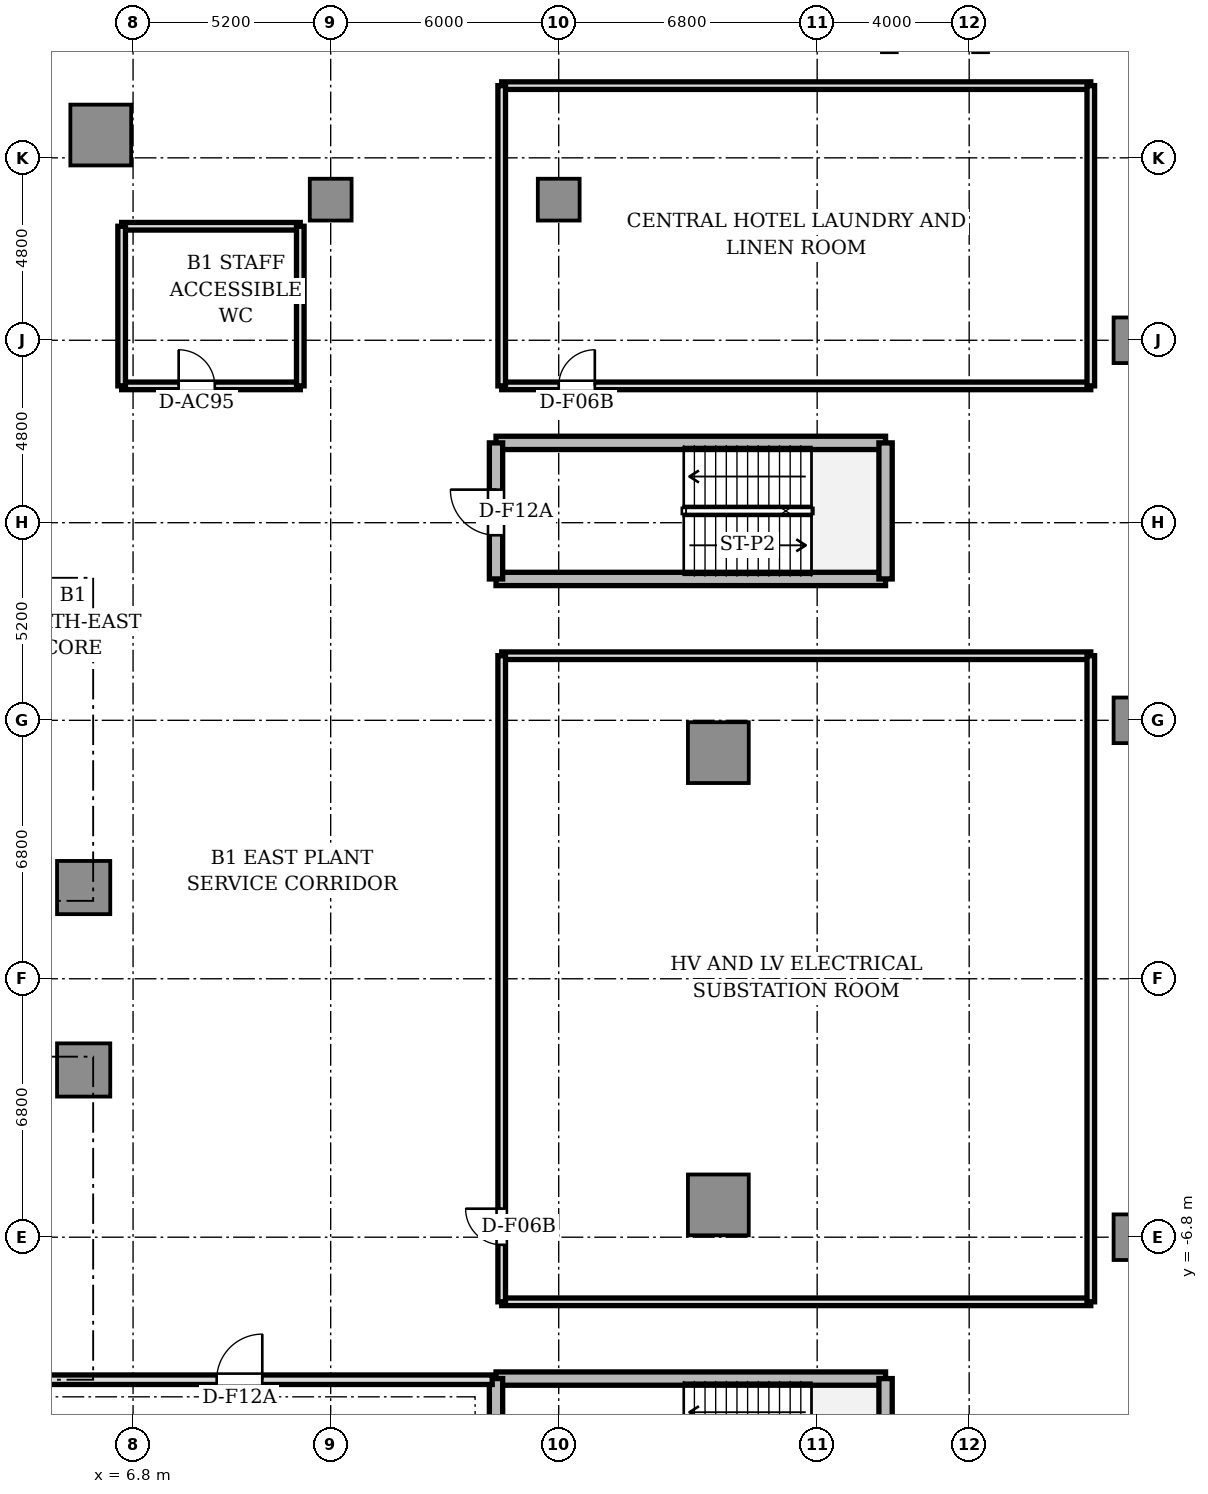
"""IFC4 building model, lengths in metres.
Left out: names, types, materials, properties, quantities, classifications, styles, units other than length and angle.
Written with IfcOpenShell. Run it as: python <this file> out.ifc"""

import sys

from ifc_helpers import new_model, si_unit, direction, frame, frame_2d, origin, origin_2d, place, context, subcontext, project, spatial, rectangle, circle, extrude, source, transform, mapped, element, fill, save


model = new_model("IFC4")
c1 = context("Model", 3, precision=1e-05, world=origin(), true_north=direction((0.0, 1.0)))
c2 = subcontext(c1, "Body", "Model", "MODEL_VIEW")
j1 = project(units=[si_unit("LENGTHUNIT", "METRE"), si_unit("PLANEANGLEUNIT", "RADIAN")], contexts=[c1])
p1 = place(None, origin())
s1 = spatial("IfcSite", under=j1, at=p1, CompositionType="ELEMENT")
p2 = place(p1, origin())
s2 = spatial("IfcBuilding", under=s1, at=p2, CompositionType="ELEMENT")
p3 = place(p2, frame((0.0, 0.0, -4.5)))
s3 = spatial("IfcBuildingStorey", under=s2, at=p3, CompositionType="ELEMENT", Elevation=-4.5)
m1 = source(origin(), c2, "Body", "SweptSolid", [
    extrude(rectangle(XDim=1.4, YDim=1.4, at=origin_2d()), origin(), (0.0, 0.0, 1.0), 4.1),
])
for number, where, z_axis, x_axis in (
    (1, (5.5, 2.4, 0.0), (0.0, 0.0, 1.0), (1.0, 0.0, 0.0)),
    (2, (5.5, -2.4, 0.0), (0.0, 0.0, 1.0), (1.0, 0.0, 0.0)),
):
    element("IfcColumn", number, at=place(p3, frame(where, z_axis=z_axis, x_axis=x_axis)), inside=s3, PredefinedType="COLUMN", context=c2, shape_type="MappedRepresentation", body=[
        mapped(m1, transform((0.0, 0.0, 0.0), scale=1.0)),
    ])
m2 = source(origin(), c2, "Body", "SweptSolid", [
    extrude(rectangle(XDim=1.6, YDim=1.6, at=origin_2d()), origin(), (0.0, 0.0, 1.0), 4.1),
])
for number, where, z_axis, x_axis in (
    (3, (22.2, -5.95, 0.0), (0.0, 0.0, 1.0), (1.0, 0.0, 0.0)),
    (4, (22.2, 5.95, 0.0), (0.0, 0.0, 1.0), (1.0, 0.0, 0.0)),
    (5, (5.95, 22.2, 0.0), (0.0, 0.0, 1.0), (1.0, 0.0, 0.0)),
):
    element("IfcColumn", number, at=place(p3, frame(where, z_axis=z_axis, x_axis=x_axis)), inside=s3, PredefinedType="COLUMN", context=c2, shape_type="MappedRepresentation", body=[
        mapped(m2, transform((0.0, 0.0, 0.0), scale=1.0)),
    ])
m3 = source(origin(), c2, "Body", "SweptSolid", [
    extrude(rectangle(XDim=1.2, YDim=1.2, at=origin_2d()), origin(), (0.0, 0.0, 1.0), 4.1),
])
for number, where, z_axis, x_axis in (
    (6, (33.2, -6.8, 0.0), (0.0, 0.0, 1.0), (1.0, 0.0, 0.0)),
    (7, (33.2, 6.8, 0.0), (0.0, 0.0, 1.0), (1.0, 0.0, 0.0)),
    (8, (33.2, 16.8, 0.0), (0.0, 0.0, 1.0), (1.0, 0.0, 0.0)),
):
    element("IfcColumn", number, at=place(p3, frame(where, z_axis=z_axis, x_axis=x_axis)), inside=s3, PredefinedType="COLUMN", context=c2, shape_type="MappedRepresentation", body=[
        mapped(m3, transform((0.0, 0.0, 0.0), scale=1.0)),
    ])
m4 = source(origin(), c2, "Body", "SweptSolid", [
    extrude(circle(Radius=0.55, at=origin_2d()), origin(), (0.0, 0.0, 1.0), 4.1),
])
for number, where, z_axis, x_axis in (
    (9, (12.0, 20.5, 0.0), (0.0, 0.0, 1.0), (1.0, 0.0, 0.0)),
    (10, (18.0, 20.5, 0.0), (0.0, 0.0, 1.0), (1.0, 0.0, 0.0)),
):
    element("IfcColumn", number, at=place(p3, frame(where, z_axis=z_axis, x_axis=x_axis)), inside=s3, PredefinedType="COLUMN", context=c2, shape_type="MappedRepresentation", body=[
        mapped(m4, transform((0.0, 0.0, 0.0), scale=1.0)),
    ])
for number, where, z_axis, x_axis in (
    (11, (16.35, 14.1, 0.0), (0.0, 0.0, 1.0), (1.0, 0.0, 0.0)),
    (12, (16.35, 10.52, 0.0), (0.0, 0.0, 1.0), (1.0, 0.0, 0.0)),
):
    element("IfcWall", number, at=place(p3, frame(where, z_axis=z_axis, x_axis=x_axis)), inside=s3, PredefinedType="SHEAR", context=c2, shape_type="SweptSolid", body=[
        extrude(rectangle(XDim=10.25, YDim=0.35, at=frame_2d((5.125, 0.0))), origin(), (0.0, 0.0, 1.0), 4.1),
    ])
p4 = place(p3, frame((16.35, 10.52, 0.0), z_axis=(0.0, 0.0, 1.0), x_axis=(0.0, 1.0, 0.0)))
e13 = element("IfcWall", 13, at=p4, inside=s3, PredefinedType="SHEAR", context=c2, shape_type="SweptSolid", body=[
    extrude(rectangle(XDim=3.58, YDim=0.35, at=frame_2d((1.79, 0.0))), origin(), (0.0, 0.0, 1.0), 4.1),
])
p5 = place(p4, frame((1.15, 0.0, 0.0)))
e14 = element("IfcOpeningElement", 14, at=p5, cuts=e13, PredefinedType="OPENING", context=c2, shape_type="SweptSolid", body=[
    extrude(rectangle(XDim=1.2, YDim=2.2, at=frame_2d((0.6, 1.1))), frame((0.0, 0.185, 0.0), z_axis=(0.0, -1.0, 0.0), x_axis=(1.0, 0.0, 0.0)), (0.0, 0.0, 1.0), 0.37),
])
p6 = place(p3, frame((26.6, 10.52, 0.0), z_axis=(0.0, 0.0, 1.0), x_axis=(0.0, 1.0, 0.0)))
e15 = element("IfcWall", 15, at=p6, inside=s3, PredefinedType="SHEAR", context=c2, shape_type="SweptSolid", body=[
    extrude(rectangle(XDim=3.58, YDim=0.35, at=frame_2d((1.79, 0.0))), origin(), (0.0, 0.0, 1.0), 4.1),
])
p7 = place(p3, frame((16.35, -10.52, 0.0), z_axis=(0.0, 0.0, 1.0), x_axis=(1.0, 0.0, 0.0)))
e16 = element("IfcWall", 16, at=p7, inside=s3, PredefinedType="SHEAR", context=c2, shape_type="SweptSolid", body=[
    extrude(rectangle(XDim=10.25, YDim=0.35, at=frame_2d((5.125, 0.0))), origin(), (0.0, 0.0, 1.0), 4.1),
])
p8 = place(p3, frame((16.35, -14.1, 0.0), z_axis=(0.0, 0.0, 1.0), x_axis=(0.0, 1.0, 0.0)))
e17 = element("IfcWall", 17, at=p8, inside=s3, PredefinedType="SHEAR", context=c2, shape_type="SweptSolid", body=[
    extrude(rectangle(XDim=3.58, YDim=0.35, at=frame_2d((1.79, 0.0))), origin(), (0.0, 0.0, 1.0), 4.1),
])
p9 = place(p8, frame((1.15, 0.0, 0.0)))
e18 = element("IfcOpeningElement", 18, at=p9, cuts=e17, PredefinedType="OPENING", context=c2, shape_type="SweptSolid", body=[
    extrude(rectangle(XDim=1.2, YDim=2.2, at=frame_2d((0.6, 1.1))), frame((0.0, 0.185, 0.0), z_axis=(0.0, -1.0, 0.0), x_axis=(1.0, 0.0, 0.0)), (0.0, 0.0, 1.0), 0.37),
])
p10 = place(p3, frame((26.6, -14.1, 0.0), z_axis=(0.0, 0.0, 1.0), x_axis=(0.0, 1.0, 0.0)))
e19 = element("IfcWall", 19, at=p10, inside=s3, PredefinedType="SHEAR", context=c2, shape_type="SweptSolid", body=[
    extrude(rectangle(XDim=3.58, YDim=0.35, at=frame_2d((1.79, 0.0))), origin(), (0.0, 0.0, 1.0), 4.1),
])
p11 = place(p3, frame((4.0, -10.55, 0.0), z_axis=(0.0, 0.0, 1.0), x_axis=(1.0, 0.0, 0.0)))
e20 = element("IfcWall", 20, at=p11, inside=s3, PredefinedType="SOLIDWALL", context=c2, shape_type="SweptSolid", body=[
    extrude(rectangle(XDim=12.25, YDim=0.25, at=frame_2d((6.125, 0.0))), origin(), (0.0, 0.0, 1.0), 3.65),
])
p12 = place(p11, frame((5.0, 0.0, 0.0)))
e21 = element("IfcOpeningElement", 21, at=p12, cuts=e20, PredefinedType="OPENING", context=c2, shape_type="SweptSolid", body=[
    extrude(rectangle(XDim=1.2, YDim=2.2, at=frame_2d((0.6, 1.1))), frame((0.0, 0.135, 0.0), z_axis=(0.0, -1.0, 0.0), x_axis=(1.0, 0.0, 0.0)), (0.0, 0.0, 1.0), 0.27),
])
for number, where, z_axis, x_axis in (
    (22, (16.5, 8.5, 0.0), (0.0, 0.0, 1.0), (1.0, 0.0, 0.0)),
    (23, (16.5, -8.5, 0.0), (0.0, 0.0, 1.0), (1.0, 0.0, 0.0)),
):
    element("IfcWall", number, at=place(p3, frame(where, z_axis=z_axis, x_axis=x_axis)), inside=s3, PredefinedType="SOLIDWALL", context=c2, shape_type="SweptSolid", body=[
        extrude(rectangle(XDim=15.5, YDim=0.2, at=frame_2d((7.75, 0.0))), origin(), (0.0, 0.0, 1.0), 3.65),
    ])
p13 = place(p3, frame((16.5, -8.5, 0.0), z_axis=(0.0, 0.0, 1.0), x_axis=(0.0, 1.0, 0.0)))
e24 = element("IfcWall", 24, at=p13, inside=s3, PredefinedType="SOLIDWALL", context=c2, shape_type="SweptSolid", body=[
    extrude(rectangle(XDim=17.0, YDim=0.2, at=frame_2d((8.5, 0.0))), origin(), (0.0, 0.0, 1.0), 3.65),
])
p14 = place(p13, frame((1.5, 0.0, 0.0)))
e25 = element("IfcOpeningElement", 25, at=p14, cuts=e24, PredefinedType="OPENING", context=c2, shape_type="SweptSolid", body=[
    extrude(rectangle(XDim=0.95, YDim=2.15, at=frame_2d((0.475, 1.075))), frame((0.0, 0.11, 0.0), z_axis=(0.0, -1.0, 0.0), x_axis=(1.0, 0.0, 0.0)), (0.0, 0.0, 1.0), 0.22),
])
p15 = place(p3, frame((32.0, -8.5, 0.0), z_axis=(0.0, 0.0, 1.0), x_axis=(0.0, 1.0, 0.0)))
e26 = element("IfcWall", 26, at=p15, inside=s3, PredefinedType="SOLIDWALL", context=c2, shape_type="SweptSolid", body=[
    extrude(rectangle(XDim=17.0, YDim=0.2, at=frame_2d((8.5, 0.0))), origin(), (0.0, 0.0, 1.0), 3.65),
])
p16 = place(p3, frame((16.5, 23.5, 0.0), z_axis=(0.0, 0.0, 1.0), x_axis=(1.0, 0.0, 0.0)))
e27 = element("IfcWall", 27, at=p16, inside=s3, PredefinedType="SOLIDWALL", context=c2, shape_type="SweptSolid", body=[
    extrude(rectangle(XDim=15.5, YDim=0.2, at=frame_2d((7.75, 0.0))), origin(), (0.0, 0.0, 1.0), 3.65),
])
p17 = place(p3, frame((16.5, 15.6, 0.0), z_axis=(0.0, 0.0, 1.0), x_axis=(1.0, 0.0, 0.0)))
e28 = element("IfcWall", 28, at=p17, inside=s3, PredefinedType="SOLIDWALL", context=c2, shape_type="SweptSolid", body=[
    extrude(rectangle(XDim=15.5, YDim=0.2, at=frame_2d((7.75, 0.0))), origin(), (0.0, 0.0, 1.0), 3.65),
])
p18 = place(p17, frame((1.5, 0.0, 0.0)))
e29 = element("IfcOpeningElement", 29, at=p18, cuts=e28, PredefinedType="OPENING", context=c2, shape_type="SweptSolid", body=[
    extrude(rectangle(XDim=0.95, YDim=2.15, at=frame_2d((0.475, 1.075))), frame((0.0, 0.11, 0.0), z_axis=(0.0, -1.0, 0.0), x_axis=(1.0, 0.0, 0.0)), (0.0, 0.0, 1.0), 0.22),
])
p19 = place(p3, frame((16.5, 15.6, 0.0), z_axis=(0.0, 0.0, 1.0), x_axis=(0.0, 1.0, 0.0)))
e30 = element("IfcWall", 30, at=p19, inside=s3, PredefinedType="SOLIDWALL", context=c2, shape_type="SweptSolid", body=[
    extrude(rectangle(XDim=7.9, YDim=0.2, at=frame_2d((3.95, 0.0))), origin(), (0.0, 0.0, 1.0), 3.57),
])
p20 = place(p3, frame((32.0, 15.6, 0.0), z_axis=(0.0, 0.0, 1.0), x_axis=(0.0, 1.0, 0.0)))
e31 = element("IfcWall", 31, at=p20, inside=s3, PredefinedType="SOLIDWALL", context=c2, shape_type="SweptSolid", body=[
    extrude(rectangle(XDim=7.9, YDim=0.2, at=frame_2d((3.95, 0.0))), origin(), (0.0, 0.0, 1.0), 3.65),
])
p21 = place(p3, frame((6.5, 19.8, 0.0), z_axis=(0.0, 0.0, 1.0), x_axis=(1.0, 0.0, 0.0)))
e32 = element("IfcWall", 32, at=p21, inside=s3, PredefinedType="SOLIDWALL", context=c2, shape_type="SweptSolid", body=[
    extrude(rectangle(XDim=4.7, YDim=0.2, at=frame_2d((2.35, 0.0))), origin(), (0.0, 0.0, 1.0), 3.65),
])
p22 = place(p3, frame((6.5, 15.6, 0.0), z_axis=(0.0, 0.0, 1.0), x_axis=(1.0, 0.0, 0.0)))
e33 = element("IfcWall", 33, at=p22, inside=s3, PredefinedType="SOLIDWALL", context=c2, shape_type="SweptSolid", body=[
    extrude(rectangle(XDim=4.7, YDim=0.2, at=frame_2d((2.35, 0.0))), origin(), (0.0, 0.0, 1.0), 3.65),
])
p23 = place(p22, frame((1.5, 0.0, 0.0)))
e34 = element("IfcOpeningElement", 34, at=p23, cuts=e33, PredefinedType="OPENING", context=c2, shape_type="SweptSolid", body=[
    extrude(rectangle(XDim=0.95, YDim=2.15, at=frame_2d((0.475, 1.075))), frame((0.0, 0.11, 0.0), z_axis=(0.0, -1.0, 0.0), x_axis=(1.0, 0.0, 0.0)), (0.0, 0.0, 1.0), 0.22),
])
for number, where, z_axis, x_axis in (
    (35, (6.5, 15.6, 0.0), (0.0, 0.0, 1.0), (0.0, 1.0, 0.0)),
    (36, (11.2, 15.6, 0.0), (0.0, 0.0, 1.0), (0.0, 1.0, 0.0)),
):
    element("IfcWall", number, at=place(p3, frame(where, z_axis=z_axis, x_axis=x_axis)), inside=s3, PredefinedType="SOLIDWALL", context=c2, shape_type="SweptSolid", body=[
        extrude(rectangle(XDim=4.2, YDim=0.2, at=frame_2d((2.1, 0.0))), origin(), (0.0, 0.0, 1.0), 3.65),
    ])
m5 = source(origin(), c2, "Body", "SweptSolid", [
    extrude(rectangle(XDim=1.2, YDim=0.05, at=origin_2d()), origin(), (0.0, 0.0, 1.0), 2.2),
])
p24 = place(p5, frame((0.6, 0.0, 0.0)))
e37 = element("IfcDoor", 37, at=p24, inside=s3, OperationType="SINGLE_SWING_RIGHT", PredefinedType="DOOR", context=c2, shape_type="MappedRepresentation", body=[
    mapped(m5, transform((0.0, 0.0, 0.0), scale=1.0)),
])
fill(e14, e37)
p25 = place(p12, frame((0.6, 0.0, 0.0)))
e38 = element("IfcDoor", 38, at=p25, inside=s3, OperationType="SINGLE_SWING_RIGHT", PredefinedType="DOOR", context=c2, shape_type="MappedRepresentation", body=[
    mapped(m5, transform((0.0, 0.0, 0.0), scale=1.0)),
])
fill(e21, e38)
m6 = source(origin(), c2, "Body", "SweptSolid", [
    extrude(rectangle(XDim=0.95, YDim=0.05, at=origin_2d()), origin(), (0.0, 0.0, 1.0), 2.15),
])
p26 = place(p14, frame((0.475, 0.0, 0.0)))
e39 = element("IfcDoor", 39, at=p26, inside=s3, OperationType="SINGLE_SWING_RIGHT", PredefinedType="DOOR", context=c2, shape_type="MappedRepresentation", body=[
    mapped(m6, transform((0.0, 0.0, 0.0), scale=1.0)),
])
fill(e25, e39)
p27 = place(p18, frame((0.475, 0.0, 0.0)))
e40 = element("IfcDoor", 40, at=p27, inside=s3, OperationType="SINGLE_SWING_RIGHT", PredefinedType="DOOR", context=c2, shape_type="MappedRepresentation", body=[
    mapped(m6, transform((0.0, 0.0, 0.0), scale=1.0)),
])
fill(e29, e40)
p28 = place(p23, frame((0.475, 0.0, 0.0)))
e41 = element("IfcDoor", 41, at=p28, inside=s3, OperationType="SINGLE_SWING_LEFT", PredefinedType="DOOR", context=c2, shape_type="MappedRepresentation", body=[
    mapped(m6, transform((0.0, 0.0, 0.0), scale=1.0)),
])
fill(e34, e41)
save(model, sys.argv[1])
